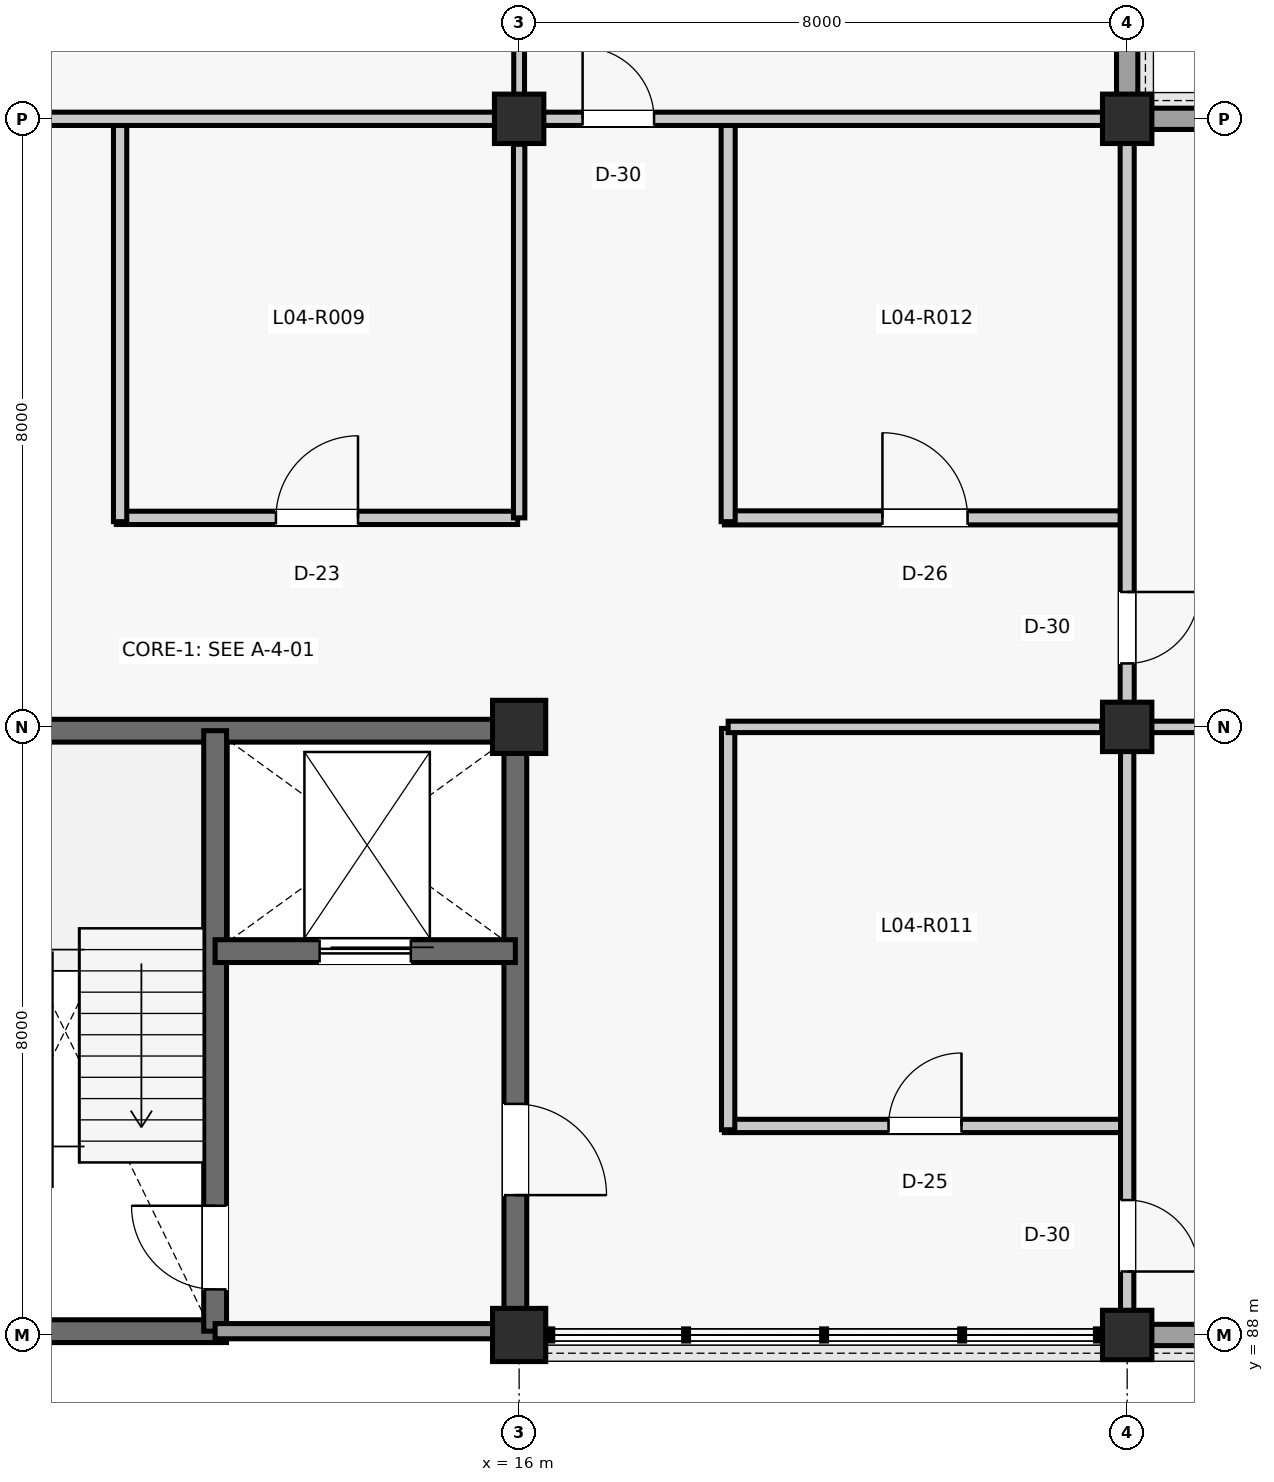
"""IFC4 building model, lengths in metres.
Left out: names, types, materials, properties, quantities, classifications, styles, units other than length and angle.
Written with IfcOpenShell. Run it as: python <this file> out.ifc"""

import sys

from ifc_helpers import new_model, si_unit, direction, frame, frame_2d, origin, origin_2d, place, context, subcontext, project, spatial, rectangle, extrude, element, fill, save


model = new_model("IFC4")
c1 = context("Model", 3, precision=1e-05, world=origin(), true_north=direction((0.0, 1.0)))
c2 = subcontext(c1, "Body", "Model", "MODEL_VIEW")
j1 = project(units=[si_unit("LENGTHUNIT", "METRE"), si_unit("PLANEANGLEUNIT", "RADIAN")], contexts=[c1])
p1 = place(None, origin())
s1 = spatial("IfcSite", under=j1, at=p1, CompositionType="ELEMENT")
p2 = place(p1, origin())
s2 = spatial("IfcBuilding", under=s1, at=p2, CompositionType="ELEMENT")
p3 = place(p2, frame((0.0, 0.0, 17.82)))
s3 = spatial("IfcBuildingStorey", under=s2, at=p3, CompositionType="ELEMENT", Elevation=17.82)
for number, where, z_axis, x_axis in (
    (1, (16.0, 88.0, 0.0), (0.0, 0.0, 1.0), (1.0, 0.0, 0.0)),
    (2, (16.0, 96.0, 0.0), (0.0, 0.0, 1.0), (1.0, 0.0, 0.0)),
):
    element("IfcColumn", number, at=place(p3, frame(where, z_axis=z_axis, x_axis=x_axis)), inside=s3, PredefinedType="COLUMN", context=c2, shape_type="SweptSolid", body=[
        extrude(rectangle(XDim=0.7, YDim=0.7, at=origin_2d()), origin(), (0.0, 0.0, 1.0), 3.96),
    ])
for number, where, z_axis, x_axis in (
    (3, (16.0, 104.0, 0.0), (0.0, 0.0, 1.0), (1.0, 0.0, 0.0)),
    (4, (24.0, 88.0, 0.0), (0.0, 0.0, 1.0), (1.0, 0.0, 0.0)),
    (5, (24.0, 96.0, 0.0), (0.0, 0.0, 1.0), (1.0, 0.0, 0.0)),
    (6, (24.0, 104.0, 0.0), (0.0, 0.0, 1.0), (1.0, 0.0, 0.0)),
):
    element("IfcColumn", number, at=place(p3, frame(where, z_axis=z_axis, x_axis=x_axis)), inside=s3, PredefinedType="COLUMN", context=c2, shape_type="SweptSolid", body=[
        extrude(rectangle(XDim=0.65, YDim=0.65, at=origin_2d()), origin(), (0.0, 0.0, 1.0), 3.96),
    ])
p4 = place(p3, frame((24.0, 104.31, 0.0), z_axis=(0.0, 0.0, 1.0), x_axis=(0.0, 1.0, 0.0)))
e7 = element("IfcWall", 7, at=p4, inside=s3, PredefinedType="SOLIDWALL", context=c2, shape_type="SweptSolid", body=[
    extrude(rectangle(XDim=7.38, YDim=0.28, at=frame_2d((3.69, 0.0))), origin(), (0.0, 0.0, 1.0), 3.285),
])
p5 = place(p4, frame((2.515, 0.0, 0.9)))
e8 = element("IfcOpeningElement", 8, at=p5, cuts=e7, PredefinedType="OPENING", context=c2, shape_type="SweptSolid", body=[
    extrude(rectangle(XDim=2.35, YDim=1.7, at=frame_2d((1.175, 0.85))), frame((0.0, 0.15, 0.0), z_axis=(0.0, -1.0, 0.0), x_axis=(1.0, 0.0, 0.0)), (0.0, 0.0, 1.0), 0.3),
])
p6 = place(p3, frame((24.31, 88.0, 0.0), z_axis=(0.0, 0.0, 1.0), x_axis=(1.0, 0.0, 0.0)))
e9 = element("IfcWall", 9, at=p6, inside=s3, PredefinedType="SOLIDWALL", context=c2, shape_type="SweptSolid", body=[
    extrude(rectangle(XDim=7.38, YDim=0.28, at=frame_2d((3.69, 0.0))), origin(), (0.0, 0.0, 1.0), 3.314),
])
p7 = place(p6, frame((2.865, 0.0, 0.9)))
e10 = element("IfcOpeningElement", 10, at=p7, cuts=e9, PredefinedType="OPENING", context=c2, shape_type="SweptSolid", body=[
    extrude(rectangle(XDim=1.65, YDim=1.75, at=frame_2d((0.825, 0.875))), frame((0.0, 0.15, 0.0), z_axis=(0.0, -1.0, 0.0), x_axis=(1.0, 0.0, 0.0)), (0.0, 0.0, 1.0), 0.3),
])
p8 = place(p3, frame((24.31, 104.0, 0.0), z_axis=(0.0, 0.0, 1.0), x_axis=(1.0, 0.0, 0.0)))
e11 = element("IfcWall", 11, at=p8, inside=s3, PredefinedType="SOLIDWALL", context=c2, shape_type="SweptSolid", body=[
    extrude(rectangle(XDim=7.355, YDim=0.28, at=frame_2d((3.677, 0.0))), origin(), (0.0, 0.0, 1.0), 3.31),
])
p9 = place(p8, frame((2.502, 0.0, 0.9)))
e12 = element("IfcOpeningElement", 12, at=p9, cuts=e11, PredefinedType="OPENING", context=c2, shape_type="SweptSolid", body=[
    extrude(rectangle(XDim=2.35, YDim=1.7, at=frame_2d((1.175, 0.85))), frame((0.0, 0.15, 0.0), z_axis=(0.0, -1.0, 0.0), x_axis=(1.0, 0.0, 0.0)), (0.0, 0.0, 1.0), 0.3),
])
p10 = place(p3, frame((8.24, 95.95, 0.0), z_axis=(0.0, 0.0, 1.0), x_axis=(1.0, 0.0, 0.0)))
e13 = element("IfcWall", 13, at=p10, inside=s3, PredefinedType="SHEAR", context=c2, shape_type="SweptSolid", body=[
    extrude(rectangle(XDim=7.52, YDim=0.3, at=frame_2d((3.76, 0.0))), origin(), (0.0, 0.0, 1.0), 3.263),
])
p11 = place(p3, frame((15.95, 88.24, 0.0), z_axis=(0.0, 0.0, 1.0), x_axis=(0.0, 1.0, 0.0)))
e14 = element("IfcWall", 14, at=p11, inside=s3, PredefinedType="SHEAR", context=c2, shape_type="SweptSolid", body=[
    extrude(rectangle(XDim=7.52, YDim=0.3, at=frame_2d((3.76, 0.0))), origin(), (0.0, 0.0, 1.0), 3.263),
])
p12 = place(p11, frame((1.6, 0.0, 0.0)))
e15 = element("IfcOpeningElement", 15, at=p12, cuts=e14, PredefinedType="OPENING", context=c2, shape_type="SweptSolid", body=[
    extrude(rectangle(XDim=1.2, YDim=2.15, at=frame_2d((0.6, 1.075))), frame((0.0, 0.16, 0.0), z_axis=(0.0, -1.0, 0.0), x_axis=(1.0, 0.0, 0.0)), (0.0, 0.0, 1.0), 0.32),
])
p13 = place(p3, frame((8.24, 88.05, 0.0), z_axis=(0.0, 0.0, 1.0), x_axis=(1.0, 0.0, 0.0)))
e16 = element("IfcWall", 16, at=p13, inside=s3, PredefinedType="SHEAR", context=c2, shape_type="SweptSolid", body=[
    extrude(rectangle(XDim=3.91, YDim=0.3, at=frame_2d((1.955, 0.0))), origin(), (0.0, 0.0, 1.0), 3.303),
])
p14 = place(p3, frame((12.0, 88.05, 0.0), z_axis=(0.0, 0.0, 1.0), x_axis=(0.0, 1.0, 0.0)))
e17 = element("IfcWall", 17, at=p14, inside=s3, PredefinedType="SHEAR", context=c2, shape_type="SweptSolid", body=[
    extrude(rectangle(XDim=7.9, YDim=0.3, at=frame_2d((3.95, 0.0))), origin(), (0.0, 0.0, 1.0), 3.263),
])
p15 = place(p14, frame((0.55, 0.0, 0.0)))
e18 = element("IfcOpeningElement", 18, at=p15, cuts=e17, PredefinedType="OPENING", context=c2, shape_type="SweptSolid", body=[
    extrude(rectangle(XDim=1.1, YDim=2.15, at=frame_2d((0.55, 1.075))), frame((0.0, 0.16, 0.0), z_axis=(0.0, -1.0, 0.0), x_axis=(1.0, 0.0, 0.0)), (0.0, 0.0, 1.0), 0.32),
])
p16 = place(p3, frame((12.0, 93.05, 0.0), z_axis=(0.0, 0.0, 1.0), x_axis=(1.0, 0.0, 0.0)))
e19 = element("IfcWall", 19, at=p16, inside=s3, PredefinedType="SHEAR", context=c2, shape_type="SweptSolid", body=[
    extrude(rectangle(XDim=3.95, YDim=0.3, at=frame_2d((1.975, 0.0))), origin(), (0.0, 0.0, 1.0), 3.263),
])
p17 = place(p16, frame((1.375, 0.0, 0.0)))
e20 = element("IfcOpeningElement", 20, at=p17, cuts=e19, PredefinedType="OPENING", context=c2, shape_type="SweptSolid", body=[
    extrude(rectangle(XDim=1.2, YDim=2.2, at=frame_2d((0.6, 1.1))), frame((0.0, 0.16, 0.0), z_axis=(0.0, -1.0, 0.0), x_axis=(1.0, 0.0, 0.0)), (0.0, 0.0, 1.0), 0.32),
])
p18 = place(p3, frame((12.0, 88.05, 0.0), z_axis=(0.0, 0.0, 1.0), x_axis=(1.0, 0.0, 0.0)))
e21 = element("IfcWall", 21, at=p18, inside=s3, PredefinedType="PARTITIONING", context=c2, shape_type="SweptSolid", body=[
    extrude(rectangle(XDim=3.66, YDim=0.2, at=frame_2d((1.83, 0.0))), origin(), (0.0, 0.0, 1.0), 3.303),
])
p19 = place(p3, frame((10.7, 98.75, 0.0), z_axis=(0.0, 0.0, 1.0), x_axis=(1.0, 0.0, 0.0)))
e22 = element("IfcWall", 22, at=p19, inside=s3, PredefinedType="PARTITIONING", context=c2, shape_type="SweptSolid", body=[
    extrude(rectangle(XDim=5.28, YDim=0.175, at=frame_2d((2.64, 0.0))), origin(), (0.0, 0.0, 1.0), 3.402),
])
p20 = place(p19, frame((2.1, 0.0, 0.0)))
e23 = element("IfcOpeningElement", 23, at=p20, cuts=e22, PredefinedType="OPENING", context=c2, shape_type="SweptSolid", body=[
    extrude(rectangle(XDim=1.08, YDim=2.2, at=frame_2d((0.54, 1.1))), frame((0.0, 0.097, 0.0), z_axis=(0.0, -1.0, 0.0), x_axis=(1.0, 0.0, 0.0)), (0.0, 0.0, 1.0), 0.195),
])
p21 = place(p3, frame((10.75, 98.7, 0.0), z_axis=(0.0, 0.0, 1.0), x_axis=(0.0, 1.0, 0.0)))
e24 = element("IfcWall", 24, at=p21, inside=s3, PredefinedType="PARTITIONING", context=c2, shape_type="SweptSolid", body=[
    extrude(rectangle(XDim=5.28, YDim=0.175, at=frame_2d((2.64, 0.0))), origin(), (0.0, 0.0, 1.0), 3.251),
])
p22 = place(p3, frame((16.0, 98.75, 0.0), z_axis=(0.0, 0.0, 1.0), x_axis=(0.0, 1.0, 0.0)))
e25 = element("IfcWall", 25, at=p22, inside=s3, PredefinedType="PARTITIONING", context=c2, shape_type="SweptSolid", body=[
    extrude(rectangle(XDim=4.915, YDim=0.15, at=frame_2d((2.458, 0.0))), origin(), (0.0, 0.0, 1.0), 3.462),
])
p23 = place(p3, frame((18.7, 90.75, 0.0), z_axis=(0.0, 0.0, 1.0), x_axis=(1.0, 0.0, 0.0)))
e26 = element("IfcWall", 26, at=p23, inside=s3, PredefinedType="PARTITIONING", context=c2, shape_type="SweptSolid", body=[
    extrude(rectangle(XDim=5.28, YDim=0.175, at=frame_2d((2.64, 0.0))), origin(), (0.0, 0.0, 1.0), 3.402),
])
p24 = place(p23, frame((2.16, 0.0, 0.0)))
e27 = element("IfcOpeningElement", 27, at=p24, cuts=e26, PredefinedType="OPENING", context=c2, shape_type="SweptSolid", body=[
    extrude(rectangle(XDim=0.96, YDim=2.14, at=frame_2d((0.48, 1.07))), frame((0.0, 0.097, 0.0), z_axis=(0.0, -1.0, 0.0), x_axis=(1.0, 0.0, 0.0)), (0.0, 0.0, 1.0), 0.195),
])
p25 = place(p3, frame((18.75, 90.7, 0.0), z_axis=(0.0, 0.0, 1.0), x_axis=(0.0, 1.0, 0.0)))
e28 = element("IfcWall", 28, at=p25, inside=s3, PredefinedType="PARTITIONING", context=c2, shape_type="SweptSolid", body=[
    extrude(rectangle(XDim=5.28, YDim=0.175, at=frame_2d((2.64, 0.0))), origin(), (0.0, 0.0, 1.0), 3.251),
])
p26 = place(p3, frame((18.75, 96.0, 0.0), z_axis=(0.0, 0.0, 1.0), x_axis=(1.0, 0.0, 0.0)))
e29 = element("IfcWall", 29, at=p26, inside=s3, PredefinedType="PARTITIONING", context=c2, shape_type="SweptSolid", body=[
    extrude(rectangle(XDim=4.915, YDim=0.15, at=frame_2d((2.458, 0.0))), origin(), (0.0, 0.0, 1.0), 3.251),
])
p27 = place(p3, frame((18.7, 98.75, 0.0), z_axis=(0.0, 0.0, 1.0), x_axis=(1.0, 0.0, 0.0)))
e30 = element("IfcWall", 30, at=p27, inside=s3, PredefinedType="PARTITIONING", context=c2, shape_type="SweptSolid", body=[
    extrude(rectangle(XDim=5.28, YDim=0.185, at=frame_2d((2.64, 0.0))), origin(), (0.0, 0.0, 1.0), 3.257),
])
p28 = place(p27, frame((2.08, 0.0, 0.0)))
e31 = element("IfcOpeningElement", 31, at=p28, cuts=e30, PredefinedType="OPENING", context=c2, shape_type="SweptSolid", body=[
    extrude(rectangle(XDim=1.12, YDim=2.22, at=frame_2d((0.56, 1.11))), frame((0.0, 0.103, 0.0), z_axis=(0.0, -1.0, 0.0), x_axis=(1.0, 0.0, 0.0)), (0.0, 0.0, 1.0), 0.205),
])
p29 = place(p3, frame((18.75, 98.7, 0.0), z_axis=(0.0, 0.0, 1.0), x_axis=(0.0, 1.0, 0.0)))
e32 = element("IfcWall", 32, at=p29, inside=s3, PredefinedType="PARTITIONING", context=c2, shape_type="SweptSolid", body=[
    extrude(rectangle(XDim=5.28, YDim=0.185, at=frame_2d((2.64, 0.0))), origin(), (0.0, 0.0, 1.0), 3.41),
])
p30 = place(p3, frame((8.315, 104.0, 0.0), z_axis=(0.0, 0.0, 1.0), x_axis=(1.0, 0.0, 0.0)))
e33 = element("IfcWall", 33, at=p30, inside=s3, PredefinedType="PARTITIONING", context=c2, shape_type="SweptSolid", body=[
    extrude(rectangle(XDim=7.37, YDim=0.175, at=frame_2d((3.685, 0.0))), origin(), (0.0, 0.0, 1.0), 3.251),
])
p31 = place(p30, frame((0.52, 0.0, 0.0)))
e34 = element("IfcOpeningElement", 34, at=p31, cuts=e33, PredefinedType="OPENING", context=c2, shape_type="SweptSolid", body=[
    extrude(rectangle(XDim=0.94, YDim=2.12, at=frame_2d((0.47, 1.06))), frame((0.0, 0.097, 0.0), z_axis=(0.0, -1.0, 0.0), x_axis=(1.0, 0.0, 0.0)), (0.0, 0.0, 1.0), 0.195),
])
p32 = place(p3, frame((16.0, 104.315, 0.0), z_axis=(0.0, 0.0, 1.0), x_axis=(0.0, 1.0, 0.0)))
e35 = element("IfcWall", 35, at=p32, inside=s3, PredefinedType="PARTITIONING", context=c2, shape_type="SweptSolid", body=[
    extrude(rectangle(XDim=7.37, YDim=0.142, at=frame_2d((3.685, 0.0))), origin(), (0.0, 0.0, 1.0), 3.232),
])
p33 = place(p3, frame((24.0, 88.315, 0.0), z_axis=(0.0, 0.0, 1.0), x_axis=(0.0, 1.0, 0.0)))
e36 = element("IfcWall", 36, at=p33, inside=s3, PredefinedType="PARTITIONING", context=c2, shape_type="SweptSolid", body=[
    extrude(rectangle(XDim=7.37, YDim=0.175, at=frame_2d((3.685, 0.0))), origin(), (0.0, 0.0, 1.0), 3.462),
])
p34 = place(p33, frame((0.52, 0.0, 0.0)))
e37 = element("IfcOpeningElement", 37, at=p34, cuts=e36, PredefinedType="OPENING", context=c2, shape_type="SweptSolid", body=[
    extrude(rectangle(XDim=0.94, YDim=2.12, at=frame_2d((0.47, 1.06))), frame((0.0, 0.097, 0.0), z_axis=(0.0, -1.0, 0.0), x_axis=(1.0, 0.0, 0.0)), (0.0, 0.0, 1.0), 0.195),
])
p35 = place(p3, frame((24.0, 96.315, 0.0), z_axis=(0.0, 0.0, 1.0), x_axis=(0.0, 1.0, 0.0)))
e38 = element("IfcWall", 38, at=p35, inside=s3, PredefinedType="PARTITIONING", context=c2, shape_type="SweptSolid", body=[
    extrude(rectangle(XDim=7.37, YDim=0.185, at=frame_2d((3.685, 0.0))), origin(), (0.0, 0.0, 1.0), 3.257),
])
p36 = place(p35, frame((0.52, 0.0, 0.0)))
e39 = element("IfcOpeningElement", 39, at=p36, cuts=e38, PredefinedType="OPENING", context=c2, shape_type="SweptSolid", body=[
    extrude(rectangle(XDim=0.94, YDim=2.12, at=frame_2d((0.47, 1.06))), frame((0.0, 0.103, 0.0), z_axis=(0.0, -1.0, 0.0), x_axis=(1.0, 0.0, 0.0)), (0.0, 0.0, 1.0), 0.205),
])
p37 = place(p3, frame((16.315, 104.0, 0.0), z_axis=(0.0, 0.0, 1.0), x_axis=(1.0, 0.0, 0.0)))
e40 = element("IfcWall", 40, at=p37, inside=s3, PredefinedType="PARTITIONING", context=c2, shape_type="SweptSolid", body=[
    extrude(rectangle(XDim=7.37, YDim=0.175, at=frame_2d((3.685, 0.0))), origin(), (0.0, 0.0, 1.0), 3.437),
])
p38 = place(p37, frame((0.52, 0.0, 0.0)))
e41 = element("IfcOpeningElement", 41, at=p38, cuts=e40, PredefinedType="OPENING", context=c2, shape_type="SweptSolid", body=[
    extrude(rectangle(XDim=0.94, YDim=2.12, at=frame_2d((0.47, 1.06))), frame((0.0, 0.097, 0.0), z_axis=(0.0, -1.0, 0.0), x_axis=(1.0, 0.0, 0.0)), (0.0, 0.0, 1.0), 0.195),
])
p39 = place(p3, frame((24.315, 96.0, 0.0), z_axis=(0.0, 0.0, 1.0), x_axis=(1.0, 0.0, 0.0)))
e42 = element("IfcWall", 42, at=p39, inside=s3, PredefinedType="PARTITIONING", context=c2, shape_type="SweptSolid", body=[
    extrude(rectangle(XDim=7.345, YDim=0.15, at=frame_2d((3.672, 0.0))), origin(), (0.0, 0.0, 1.0), 3.462),
])
p40 = place(p15, origin())
e43 = element("IfcDoor", 43, at=p40, inside=s3, OperationType="SINGLE_SWING_RIGHT", PredefinedType="DOOR", context=c2, shape_type="SweptSolid", body=[
    extrude(rectangle(XDim=1.1, YDim=2.15, at=frame_2d((0.55, 1.075))), frame((0.0, 0.025, 0.0), z_axis=(0.0, -1.0, 0.0), x_axis=(1.0, 0.0, 0.0)), (0.0, 0.0, 1.0), 0.05),
])
fill(e18, e43)
p41 = place(p17, origin())
e44 = element("IfcDoor", 44, at=p41, inside=s3, OperationType="SLIDING_TO_LEFT", PredefinedType="DOOR", context=c2, shape_type="SweptSolid", body=[
    extrude(rectangle(XDim=1.2, YDim=2.2, at=frame_2d((0.6, 1.1))), frame((0.0, 0.025, 0.0), z_axis=(0.0, -1.0, 0.0), x_axis=(1.0, 0.0, 0.0)), (0.0, 0.0, 1.0), 0.05),
])
fill(e20, e44)
p42 = place(p12, frame((1.2, 0.0, 0.0), z_axis=(0.0, 0.0, 1.0), x_axis=(-1.0, 0.0, 0.0)))
e45 = element("IfcDoor", 45, at=p42, inside=s3, OperationType="SINGLE_SWING_LEFT", PredefinedType="DOOR", context=c2, shape_type="SweptSolid", body=[
    extrude(rectangle(XDim=1.2, YDim=2.15, at=frame_2d((0.6, 1.075))), frame((0.0, 0.025, 0.0), z_axis=(0.0, -1.0, 0.0), x_axis=(1.0, 0.0, 0.0)), (0.0, 0.0, 1.0), 0.05),
])
fill(e15, e45)
p43 = place(p20, origin())
e46 = element("IfcDoor", 46, at=p43, inside=s3, OperationType="SINGLE_SWING_RIGHT", PredefinedType="DOOR", context=c2, shape_type="SweptSolid", body=[
    extrude(rectangle(XDim=1.08, YDim=2.2, at=frame_2d((0.54, 1.1))), frame((0.0, 0.025, 0.0), z_axis=(0.0, -1.0, 0.0), x_axis=(1.0, 0.0, 0.0)), (0.0, 0.0, 1.0), 0.05),
])
fill(e23, e46)
p44 = place(p24, origin())
e47 = element("IfcDoor", 47, at=p44, inside=s3, OperationType="SINGLE_SWING_RIGHT", PredefinedType="DOOR", context=c2, shape_type="SweptSolid", body=[
    extrude(rectangle(XDim=0.96, YDim=2.14, at=frame_2d((0.48, 1.07))), frame((0.0, 0.025, 0.0), z_axis=(0.0, -1.0, 0.0), x_axis=(1.0, 0.0, 0.0)), (0.0, 0.0, 1.0), 0.05),
])
fill(e27, e47)
p45 = place(p28, origin())
e48 = element("IfcDoor", 48, at=p45, inside=s3, OperationType="SINGLE_SWING_LEFT", PredefinedType="DOOR", context=c2, shape_type="SweptSolid", body=[
    extrude(rectangle(XDim=1.12, YDim=2.22, at=frame_2d((0.56, 1.11))), frame((0.0, 0.025, 0.0), z_axis=(0.0, -1.0, 0.0), x_axis=(1.0, 0.0, 0.0)), (0.0, 0.0, 1.0), 0.05),
])
fill(e31, e48)
p46 = place(p34, frame((0.94, 0.0, 0.0), z_axis=(0.0, 0.0, 1.0), x_axis=(-1.0, 0.0, 0.0)))
e49 = element("IfcDoor", 49, at=p46, inside=s3, OperationType="SINGLE_SWING_LEFT", PredefinedType="DOOR", context=c2, shape_type="SweptSolid", body=[
    extrude(rectangle(XDim=0.94, YDim=2.12, at=frame_2d((0.47, 1.06))), frame((0.0, 0.025, 0.0), z_axis=(0.0, -1.0, 0.0), x_axis=(1.0, 0.0, 0.0)), (0.0, 0.0, 1.0), 0.05),
])
fill(e37, e49)
p47 = place(p36, frame((0.94, 0.0, 0.0), z_axis=(0.0, 0.0, 1.0), x_axis=(-1.0, 0.0, 0.0)))
e50 = element("IfcDoor", 50, at=p47, inside=s3, OperationType="SINGLE_SWING_RIGHT", PredefinedType="DOOR", context=c2, shape_type="SweptSolid", body=[
    extrude(rectangle(XDim=0.94, YDim=2.12, at=frame_2d((0.47, 1.06))), frame((0.0, 0.025, 0.0), z_axis=(0.0, -1.0, 0.0), x_axis=(1.0, 0.0, 0.0)), (0.0, 0.0, 1.0), 0.05),
])
fill(e39, e50)
p48 = place(p38, origin())
e51 = element("IfcDoor", 51, at=p48, inside=s3, OperationType="SINGLE_SWING_LEFT", PredefinedType="DOOR", context=c2, shape_type="SweptSolid", body=[
    extrude(rectangle(XDim=0.94, YDim=2.12, at=frame_2d((0.47, 1.06))), frame((0.0, 0.025, 0.0), z_axis=(0.0, -1.0, 0.0), x_axis=(1.0, 0.0, 0.0)), (0.0, 0.0, 1.0), 0.05),
])
fill(e41, e51)
save(model, sys.argv[1])
